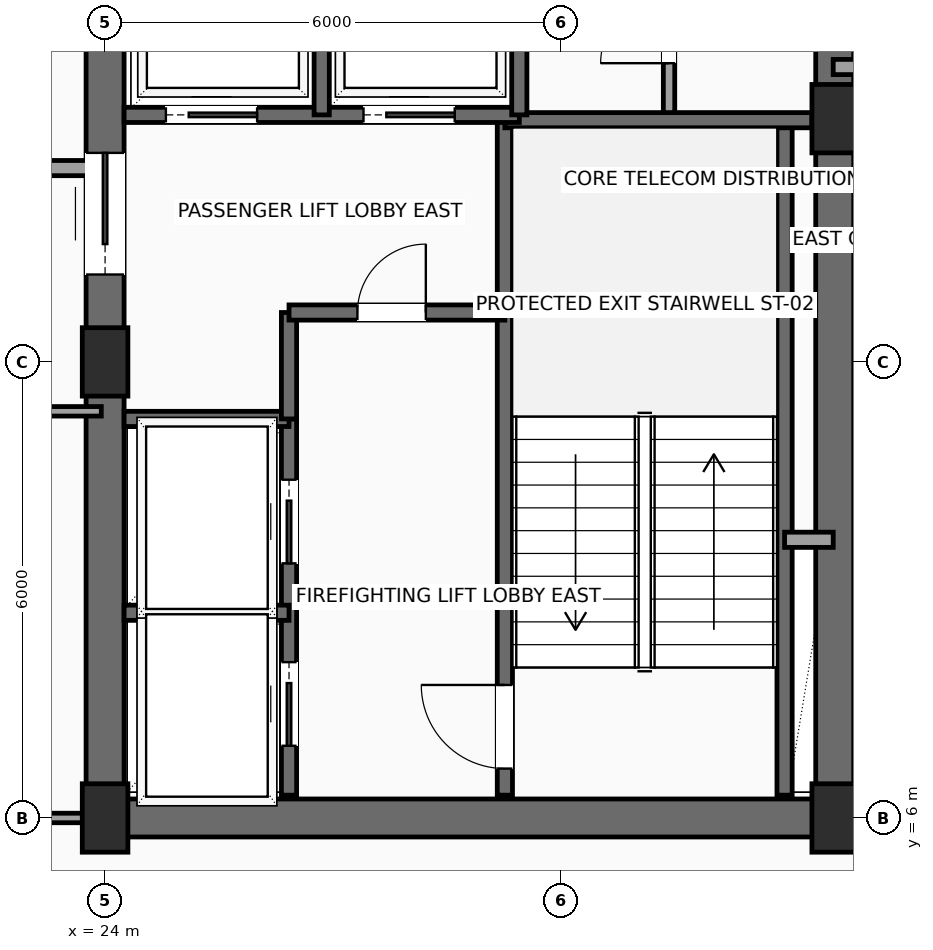
"""IFC4 building model, lengths in metres.
Left out: names, types, materials, properties, quantities, classifications, styles, units other than length and angle.
Written with IfcOpenShell. Run it as: python <this file> out.ifc"""

import sys

from ifc_helpers import new_model, si_unit, direction, frame, frame_2d, origin, origin_2d, place, context, subcontext, project, spatial, rectangle, extrude, element, fill, save


model = new_model("IFC4")
c1 = context("Model", 3, precision=1e-05, world=origin(), true_north=direction((0.0, 1.0)))
c2 = subcontext(c1, "Body", "Model", "MODEL_VIEW")
j1 = project(units=[si_unit("LENGTHUNIT", "METRE"), si_unit("PLANEANGLEUNIT", "RADIAN")], contexts=[c1])
p1 = place(None, origin())
s1 = spatial("IfcSite", under=j1, at=p1, CompositionType="ELEMENT")
p2 = place(p1, origin())
s2 = spatial("IfcBuilding", under=s1, at=p2, CompositionType="ELEMENT")
p3 = place(p2, frame((0.0, 0.0, 246.7)))
s3 = spatial("IfcBuildingStorey", under=s2, at=p3, CompositionType="ELEMENT", Elevation=246.7)
for number, where, z_axis, x_axis in (
    (1, (24.0, 6.0, 0.0), (0.0, 0.0, 1.0), (1.0, 0.0, 0.0)),
    (2, (24.0, 12.0, 0.0), (0.0, 0.0, 1.0), (1.0, 0.0, 0.0)),
    (3, (33.6, 6.0, 0.0), (0.0, 0.0, 1.0), (1.0, 0.0, 0.0)),
    (4, (33.6, 15.2, 0.0), (0.0, 0.0, 1.0), (1.0, 0.0, 0.0)),
):
    element("IfcColumn", number, at=place(p3, frame(where, z_axis=z_axis, x_axis=x_axis)), inside=s3, PredefinedType="COLUMN", context=c2, shape_type="SweptSolid", body=[
        extrude(rectangle(XDim=0.6, YDim=0.9, at=origin_2d()), origin(), (0.0, 0.0, 1.0), 3.5),
    ])
p4 = place(p3, frame((24.0, 6.0, 0.0), z_axis=(0.0, 0.0, 1.0), x_axis=(1.0, 0.0, 0.0)))
e5 = element("IfcWall", 5, at=p4, inside=s3, PredefinedType="SHEAR", context=c2, shape_type="SweptSolid", body=[
    extrude(rectangle(XDim=9.6, YDim=0.5, at=frame_2d((4.8, 0.0))), origin(), (0.0, 0.0, 1.0), 3.3),
])
p5 = place(p3, frame((24.0, 6.0, 0.0), z_axis=(0.0, 0.0, 1.0), x_axis=(0.0, 1.0, 0.0)))
e6 = element("IfcWall", 6, at=p5, inside=s3, PredefinedType="SHEAR", context=c2, shape_type="SweptSolid", body=[
    extrude(rectangle(XDim=12.0, YDim=0.5, at=frame_2d((6.0, 0.0))), origin(), (0.0, 0.0, 1.0), 3.3),
])
p6 = place(p5, frame((7.15, 0.0, 0.0)))
e7 = element("IfcOpeningElement", 7, at=p6, cuts=e6, PredefinedType="OPENING", context=c2, shape_type="SweptSolid", body=[
    extrude(rectangle(XDim=1.6, YDim=2.3, at=frame_2d((0.8, 1.15))), frame((0.0, 0.26, 0.0), z_axis=(0.0, -1.0, 0.0), x_axis=(1.0, 0.0, 0.0)), (0.0, 0.0, 1.0), 0.52),
])
p7 = place(p3, frame((33.6, 6.0, 0.0), z_axis=(0.0, 0.0, 1.0), x_axis=(0.0, 1.0, 0.0)))
e8 = element("IfcWall", 8, at=p7, inside=s3, PredefinedType="SHEAR", context=c2, shape_type="SweptSolid", body=[
    extrude(rectangle(XDim=12.0, YDim=0.5, at=frame_2d((6.0, 0.0))), origin(), (0.0, 0.0, 1.0), 3.3),
])
p8 = place(p7, frame((10.3, 0.0, 0.0)))
e9 = element("IfcOpeningElement", 9, at=p8, cuts=e8, PredefinedType="OPENING", context=c2, shape_type="SweptSolid", body=[
    extrude(rectangle(XDim=0.9, YDim=2.15, at=frame_2d((0.45, 1.075))), frame((0.0, 0.26, 0.0), z_axis=(0.0, -1.0, 0.0), x_axis=(1.0, 0.0, 0.0)), (0.0, 0.0, 1.0), 0.52),
])
p9 = place(p3, frame((29.26, 6.3, 0.0), z_axis=(0.0, 0.0, 1.0), x_axis=(0.0, 1.0, 0.0)))
e10 = element("IfcWall", 10, at=p9, inside=s3, PredefinedType="SHEAR", context=c2, shape_type="SweptSolid", body=[
    extrude(rectangle(XDim=8.88, YDim=0.2, at=frame_2d((4.44, 0.0))), origin(), (0.0, 0.0, 1.0), 3.3),
])
p10 = place(p9, frame((0.35, 0.0, 0.0)))
e11 = element("IfcOpeningElement", 11, at=p10, cuts=e10, PredefinedType="OPENING", context=c2, shape_type="SweptSolid", body=[
    extrude(rectangle(XDim=1.1, YDim=2.2, at=frame_2d((0.55, 1.1))), frame((0.0, 0.11, 0.0), z_axis=(0.0, -1.0, 0.0), x_axis=(1.0, 0.0, 0.0)), (0.0, 0.0, 1.0), 0.22),
])
p11 = place(p3, frame((32.94, 6.3, 0.0), z_axis=(0.0, 0.0, 1.0), x_axis=(0.0, 1.0, 0.0)))
e12 = element("IfcWall", 12, at=p11, inside=s3, PredefinedType="SHEAR", context=c2, shape_type="SweptSolid", body=[
    extrude(rectangle(XDim=8.88, YDim=0.2, at=frame_2d((4.44, 0.0))), origin(), (0.0, 0.0, 1.0), 3.3),
])
p12 = place(p3, frame((29.26, 15.18, 0.0), z_axis=(0.0, 0.0, 1.0), x_axis=(1.0, 0.0, 0.0)))
e13 = element("IfcWall", 13, at=p12, inside=s3, PredefinedType="SHEAR", context=c2, shape_type="SweptSolid", body=[
    extrude(rectangle(XDim=4.04, YDim=0.2, at=frame_2d((2.02, 0.0))), origin(), (0.0, 0.0, 1.0), 3.3),
])
p13 = place(p3, frame((26.42, 6.3, 0.0), z_axis=(0.0, 0.0, 1.0), x_axis=(0.0, 1.0, 0.0)))
e14 = element("IfcWall", 14, at=p13, inside=s3, PredefinedType="SHEAR", context=c2, shape_type="SweptSolid", body=[
    extrude(rectangle(XDim=4.95, YDim=0.2, at=frame_2d((2.475, 0.0))), origin(), (0.0, 0.0, 1.0), 3.3),
])
p14 = place(p13, frame((0.65, 0.0, 0.0)))
e15 = element("IfcOpeningElement", 15, at=p14, cuts=e14, PredefinedType="OPENING", context=c2, shape_type="SweptSolid", body=[
    extrude(rectangle(XDim=1.1, YDim=2.2, at=frame_2d((0.55, 1.1))), frame((0.0, 0.11, 0.0), z_axis=(0.0, -1.0, 0.0), x_axis=(1.0, 0.0, 0.0)), (0.0, 0.0, 1.0), 0.22),
])
p15 = place(p13, frame((3.05, 0.0, 0.0)))
e16 = element("IfcOpeningElement", 16, at=p15, cuts=e14, PredefinedType="OPENING", context=c2, shape_type="SweptSolid", body=[
    extrude(rectangle(XDim=1.1, YDim=2.2, at=frame_2d((0.55, 1.1))), frame((0.0, 0.11, 0.0), z_axis=(0.0, -1.0, 0.0), x_axis=(1.0, 0.0, 0.0)), (0.0, 0.0, 1.0), 0.22),
])
for number, where, z_axis, x_axis in (
    (17, (24.25, 8.7, 0.0), (0.0, 0.0, 1.0), (1.0, 0.0, 0.0)),
    (18, (24.25, 11.25, 0.0), (0.0, 0.0, 1.0), (1.0, 0.0, 0.0)),
):
    element("IfcWall", number, at=place(p3, frame(where, z_axis=z_axis, x_axis=x_axis)), inside=s3, PredefinedType="SHEAR", context=c2, shape_type="SweptSolid", body=[
        extrude(rectangle(XDim=2.17, YDim=0.2, at=frame_2d((1.085, 0.0))), origin(), (0.0, 0.0, 1.0), 3.3),
    ])
p16 = place(p3, frame((26.42, 11.25, 0.0), z_axis=(0.0, 0.0, 1.0), x_axis=(0.0, 1.0, 0.0)))
e19 = element("IfcWall", 19, at=p16, inside=s3, PredefinedType="SHEAR", context=c2, shape_type="SweptSolid", body=[
    extrude(rectangle(XDim=1.4, YDim=0.2, at=frame_2d((0.7, 0.0))), origin(), (0.0, 0.0, 1.0), 3.3),
])
p17 = place(p3, frame((26.42, 12.65, 0.0), z_axis=(0.0, 0.0, 1.0), x_axis=(1.0, 0.0, 0.0)))
e20 = element("IfcWall", 20, at=p17, inside=s3, PredefinedType="SHEAR", context=c2, shape_type="SweptSolid", body=[
    extrude(rectangle(XDim=2.84, YDim=0.2, at=frame_2d((1.42, 0.0))), origin(), (0.0, 0.0, 1.0), 3.3),
])
p18 = place(p17, frame((0.9, 0.0, 0.0)))
e21 = element("IfcOpeningElement", 21, at=p18, cuts=e20, PredefinedType="OPENING", context=c2, shape_type="SweptSolid", body=[
    extrude(rectangle(XDim=0.9, YDim=2.15, at=frame_2d((0.45, 1.075))), frame((0.0, 0.11, 0.0), z_axis=(0.0, -1.0, 0.0), x_axis=(1.0, 0.0, 0.0)), (0.0, 0.0, 1.0), 0.22),
])
p19 = place(p3, frame((32.94, 9.66, 0.0), z_axis=(0.0, 0.0, 1.0), x_axis=(1.0, 0.0, 0.0)))
e22 = element("IfcWall", 22, at=p19, inside=s3, PredefinedType="SOLIDWALL", context=c2, shape_type="SweptSolid", body=[
    extrude(rectangle(XDim=0.64, YDim=0.2, at=frame_2d((0.32, 0.0))), origin(), (0.0, 0.0, 1.0), 3.3),
])
p20 = place(p3, frame((24.25, 15.25, 0.0), z_axis=(0.0, 0.0, 1.0), x_axis=(1.0, 0.0, 0.0)))
e23 = element("IfcWall", 23, at=p20, inside=s3, PredefinedType="SHEAR", context=c2, shape_type="SweptSolid", body=[
    extrude(rectangle(XDim=5.2, YDim=0.2, at=frame_2d((2.6, 0.0))), origin(), (0.0, 0.0, 1.0), 3.3),
])
p21 = place(p20, frame((0.55, 0.0, 0.0)))
e24 = element("IfcOpeningElement", 24, at=p21, cuts=e23, PredefinedType="OPENING", context=c2, shape_type="SweptSolid", body=[
    extrude(rectangle(XDim=1.2, YDim=2.2, at=frame_2d((0.6, 1.1))), frame((0.0, 0.11, 0.0), z_axis=(0.0, -1.0, 0.0), x_axis=(1.0, 0.0, 0.0)), (0.0, 0.0, 1.0), 0.22),
])
p22 = place(p20, frame((3.15, 0.0, 0.0)))
e25 = element("IfcOpeningElement", 25, at=p22, cuts=e23, PredefinedType="OPENING", context=c2, shape_type="SweptSolid", body=[
    extrude(rectangle(XDim=1.2, YDim=2.2, at=frame_2d((0.6, 1.1))), frame((0.0, 0.11, 0.0), z_axis=(0.0, -1.0, 0.0), x_axis=(1.0, 0.0, 0.0)), (0.0, 0.0, 1.0), 0.22),
])
p23 = place(p3, frame((26.85, 15.25, 0.0), z_axis=(0.0, 0.0, 1.0), x_axis=(0.0, 1.0, 0.0)))
e26 = element("IfcWall", 26, at=p23, inside=s3, PredefinedType="SHEAR", context=c2, shape_type="SweptSolid", body=[
    extrude(rectangle(XDim=2.4, YDim=0.2, at=frame_2d((1.2, 0.0))), origin(), (0.0, 0.0, 1.0), 3.3),
])
p24 = place(p3, frame((29.45, 15.25, 0.0), z_axis=(0.0, 0.0, 1.0), x_axis=(0.0, 1.0, 0.0)))
e27 = element("IfcWall", 27, at=p24, inside=s3, PredefinedType="SHEAR", context=c2, shape_type="SweptSolid", body=[
    extrude(rectangle(XDim=2.45, YDim=0.2, at=frame_2d((1.225, 0.0))), origin(), (0.0, 0.0, 1.0), 3.3),
])
p25 = place(p3, frame((31.42, 15.28, 0.0), z_axis=(0.0, 0.0, 1.0), x_axis=(0.0, 1.0, 0.0)))
e28 = element("IfcWall", 28, at=p25, inside=s3, PredefinedType="PARTITIONING", context=c2, shape_type="SweptSolid", body=[
    extrude(rectangle(XDim=2.42, YDim=0.15, at=frame_2d((1.21, 0.0))), origin(), (0.0, 0.0, 1.0), 3.3),
])
p26 = place(p25, frame((0.65, 0.0, 0.0)))
e29 = element("IfcOpeningElement", 29, at=p26, cuts=e28, PredefinedType="OPENING", context=c2, shape_type="SweptSolid", body=[
    extrude(rectangle(XDim=0.9, YDim=2.15, at=frame_2d((0.45, 1.075))), frame((0.0, 0.085, 0.0), z_axis=(0.0, -1.0, 0.0), x_axis=(1.0, 0.0, 0.0)), (0.0, 0.0, 1.0), 0.17),
])
p27 = place(p3, frame((35.7, 15.88, 0.0), z_axis=(0.0, 0.0, 1.0), x_axis=(-1.0, 0.0, 0.0)))
e30 = element("IfcWall", 30, at=p27, inside=s3, PredefinedType="PARTITIONING", context=c2, shape_type="SweptSolid", body=[
    extrude(rectangle(XDim=2.12, YDim=0.2, at=frame_2d((1.06, 0.0))), origin(), (0.0, 0.0, 1.0), 3.3),
])
p28 = place(p3, frame((23.95, 14.55, 0.0), z_axis=(0.0, 0.0, 1.0), x_axis=(-1.0, 0.0, 0.0)))
e31 = element("IfcWall", 31, at=p28, inside=s3, PredefinedType="PARTITIONING", context=c2, shape_type="SweptSolid", body=[
    extrude(rectangle(XDim=9.0, YDim=0.2, at=frame_2d((4.5, 0.0))), origin(), (0.0, 0.0, 1.0), 3.3),
])
p29 = place(p28, frame((6.925, 0.0, 0.0)))
e32 = element("IfcOpeningElement", 32, at=p29, cuts=e31, PredefinedType="OPENING", context=c2, shape_type="SweptSolid", body=[
    extrude(rectangle(XDim=1.0, YDim=2.2, at=frame_2d((0.5, 1.1))), frame((0.0, 0.11, 0.0), z_axis=(0.0, -1.0, 0.0), x_axis=(1.0, 0.0, 0.0)), (0.0, 0.0, 1.0), 0.22),
])
p30 = place(p3, frame((18.0, 6.0, 0.0), z_axis=(0.0, 0.0, 1.0), x_axis=(1.0, 0.0, 0.0)))
e33 = element("IfcWall", 33, at=p30, inside=s3, PredefinedType="PARTITIONING", context=c2, shape_type="SweptSolid", body=[
    extrude(rectangle(XDim=5.95, YDim=0.125, at=frame_2d((2.975, 0.0))), origin(), (0.0, 0.0, 1.0), 2.992),
])
p31 = place(p3, frame((18.0, 11.35, 0.0), z_axis=(0.0, 0.0, 1.0), x_axis=(1.0, 0.0, 0.0)))
e34 = element("IfcWall", 34, at=p31, inside=s3, PredefinedType="PARTITIONING", context=c2, shape_type="SweptSolid", body=[
    extrude(rectangle(XDim=5.95, YDim=0.125, at=frame_2d((2.975, 0.0))), origin(), (0.0, 0.0, 1.0), 3.3),
])
p32 = place(p6, origin())
e35 = element("IfcDoor", 35, at=p32, inside=s3, OperationType="DOUBLE_DOOR_SLIDING", PredefinedType="DOOR", context=c2, shape_type="SweptSolid", body=[
    extrude(rectangle(XDim=1.6, YDim=2.3, at=frame_2d((0.8, 1.15))), frame((0.0, 0.025, 0.0), z_axis=(0.0, -1.0, 0.0), x_axis=(1.0, 0.0, 0.0)), (0.0, 0.0, 1.0), 0.05),
])
fill(e7, e35)
p33 = place(p10, origin())
e36 = element("IfcDoor", 36, at=p33, inside=s3, OperationType="SINGLE_SWING_RIGHT", PredefinedType="DOOR", context=c2, shape_type="SweptSolid", body=[
    extrude(rectangle(XDim=1.1, YDim=2.2, at=frame_2d((0.55, 1.1))), frame((0.0, 0.025, 0.0), z_axis=(0.0, -1.0, 0.0), x_axis=(1.0, 0.0, 0.0)), (0.0, 0.0, 1.0), 0.05),
])
fill(e11, e36)
p34 = place(p14, origin())
e37 = element("IfcDoor", 37, at=p34, inside=s3, OperationType="SLIDING_TO_LEFT", PredefinedType="DOOR", context=c2, shape_type="SweptSolid", body=[
    extrude(rectangle(XDim=1.1, YDim=2.2, at=frame_2d((0.55, 1.1))), frame((0.0, 0.025, 0.0), z_axis=(0.0, -1.0, 0.0), x_axis=(1.0, 0.0, 0.0)), (0.0, 0.0, 1.0), 0.05),
])
fill(e15, e37)
p35 = place(p15, origin())
e38 = element("IfcDoor", 38, at=p35, inside=s3, OperationType="SLIDING_TO_LEFT", PredefinedType="DOOR", context=c2, shape_type="SweptSolid", body=[
    extrude(rectangle(XDim=1.1, YDim=2.2, at=frame_2d((0.55, 1.1))), frame((0.0, 0.025, 0.0), z_axis=(0.0, -1.0, 0.0), x_axis=(1.0, 0.0, 0.0)), (0.0, 0.0, 1.0), 0.05),
])
fill(e16, e38)
p36 = place(p18, origin())
e39 = element("IfcDoor", 39, at=p36, inside=s3, OperationType="SINGLE_SWING_RIGHT", PredefinedType="DOOR", context=c2, shape_type="SweptSolid", body=[
    extrude(rectangle(XDim=0.9, YDim=2.15, at=frame_2d((0.45, 1.075))), frame((0.0, 0.025, 0.0), z_axis=(0.0, -1.0, 0.0), x_axis=(1.0, 0.0, 0.0)), (0.0, 0.0, 1.0), 0.05),
])
fill(e21, e39)
p37 = place(p21, origin())
e40 = element("IfcDoor", 40, at=p37, inside=s3, OperationType="SLIDING_TO_RIGHT", PredefinedType="DOOR", context=c2, shape_type="SweptSolid", body=[
    extrude(rectangle(XDim=1.2, YDim=2.2, at=frame_2d((0.6, 1.1))), frame((0.0, 0.025, 0.0), z_axis=(0.0, -1.0, 0.0), x_axis=(1.0, 0.0, 0.0)), (0.0, 0.0, 1.0), 0.05),
])
fill(e24, e40)
p38 = place(p22, origin())
e41 = element("IfcDoor", 41, at=p38, inside=s3, OperationType="SLIDING_TO_RIGHT", PredefinedType="DOOR", context=c2, shape_type="SweptSolid", body=[
    extrude(rectangle(XDim=1.2, YDim=2.2, at=frame_2d((0.6, 1.1))), frame((0.0, 0.025, 0.0), z_axis=(0.0, -1.0, 0.0), x_axis=(1.0, 0.0, 0.0)), (0.0, 0.0, 1.0), 0.05),
])
fill(e25, e41)
p39 = place(p26, origin())
e42 = element("IfcDoor", 42, at=p39, inside=s3, OperationType="SINGLE_SWING_LEFT", PredefinedType="DOOR", context=c2, shape_type="SweptSolid", body=[
    extrude(rectangle(XDim=0.9, YDim=2.15, at=frame_2d((0.45, 1.075))), frame((0.0, 0.025, 0.0), z_axis=(0.0, -1.0, 0.0), x_axis=(1.0, 0.0, 0.0)), (0.0, 0.0, 1.0), 0.05),
])
fill(e29, e42)
save(model, sys.argv[1])
